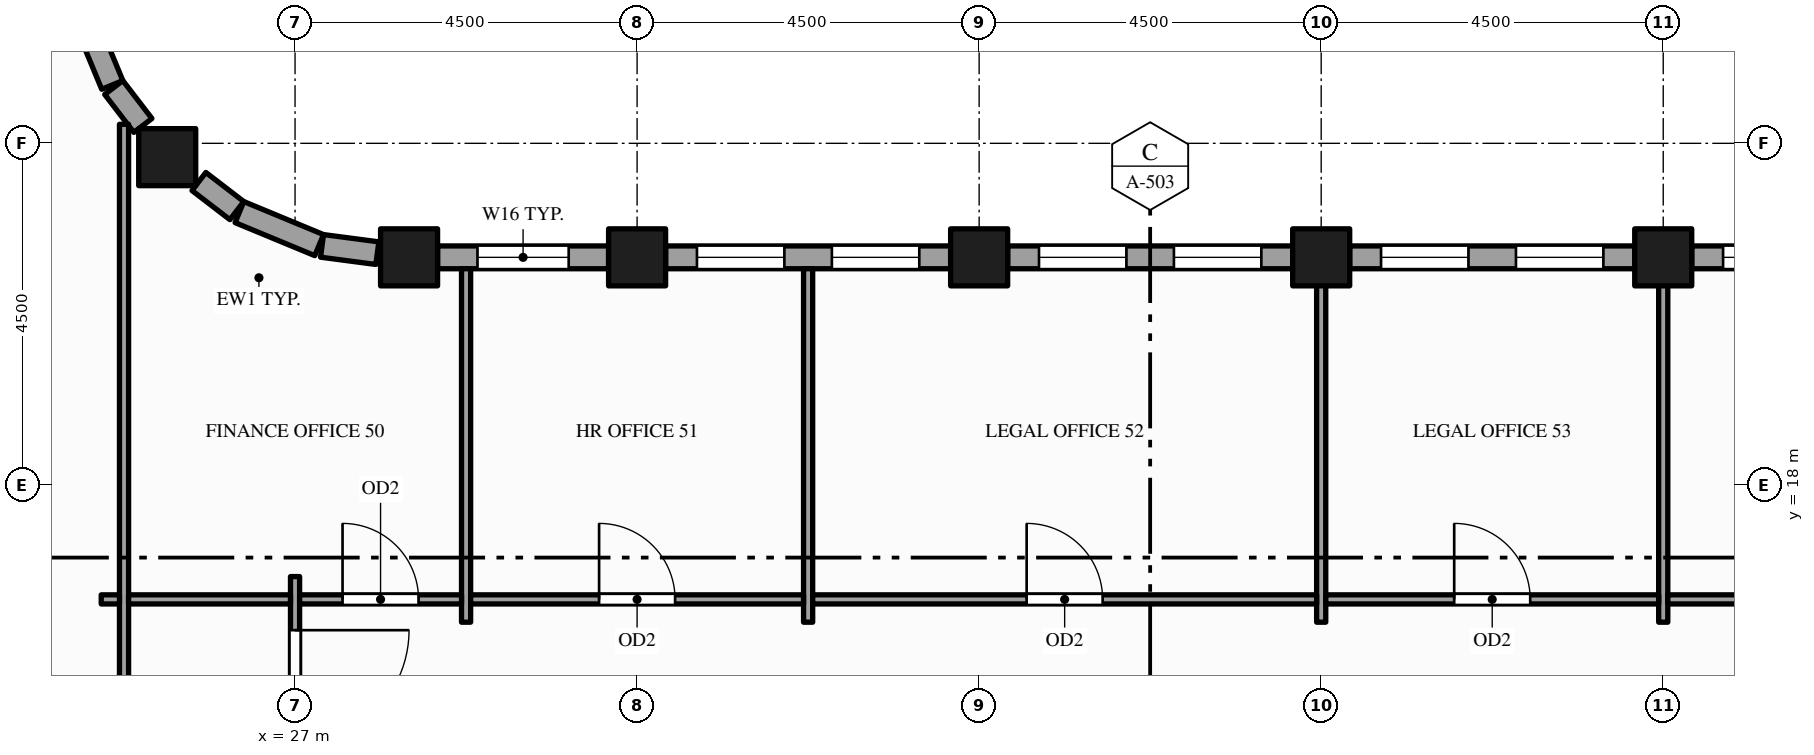
"""IFC4 building model, lengths in metres.
Left out: names, types, materials, properties, quantities, classifications, styles, units other than length and angle.
Written with IfcOpenShell. Run it as: python <this file> out.ifc"""

import sys

from ifc_helpers import new_model, si_unit, direction, frame, frame_2d, origin, origin_2d, place, context, subcontext, project, spatial, rectangle, hollow_rectangle, extrude, element, fill, save


model = new_model("IFC4")
c1 = context("Model", 3, precision=1e-05, world=origin(), true_north=direction((0.0, 1.0)))
c2 = subcontext(c1, "Body", "Model", "MODEL_VIEW")
j1 = project(units=[si_unit("LENGTHUNIT", "METRE"), si_unit("PLANEANGLEUNIT", "RADIAN")], contexts=[c1])
p1 = place(None, origin())
s1 = spatial("IfcSite", under=j1, at=p1, CompositionType="ELEMENT")
p2 = place(p1, origin())
s2 = spatial("IfcBuilding", under=s1, at=p2, CompositionType="ELEMENT")
p3 = place(p2, frame((0.0, 0.0, 195.0)))
s3 = spatial("IfcBuildingStorey", under=s2, at=p3, CompositionType="ELEMENT", Elevation=195.0)
for number, where, z_axis, x_axis in (
    (1, (25.318, 22.318, -0.15), (0.0, 0.0, 1.0), (1.0, 0.0, 0.0)),
    (2, (28.5, 21.0, -0.15), (0.0, 0.0, 1.0), (1.0, 0.0, 0.0)),
    (3, (31.5, 21.0, -0.15), (0.0, 0.0, 1.0), (1.0, 0.0, 0.0)),
    (4, (36.0, 21.0, -0.15), (0.0, 0.0, 1.0), (1.0, 0.0, 0.0)),
    (5, (40.5, 21.0, -0.15), (0.0, 0.0, 1.0), (1.0, 0.0, 0.0)),
    (6, (45.0, 21.0, -0.15), (0.0, 0.0, 1.0), (1.0, 0.0, 0.0)),
):
    element("IfcColumn", number, at=place(p3, frame(where, z_axis=z_axis, x_axis=x_axis)), inside=s3, PredefinedType="COLUMN", context=c2, shape_type="SweptSolid", body=[
        extrude(hollow_rectangle(XDim=0.75, YDim=0.75, WallThickness=0.036, at=origin_2d()), origin(), (0.0, 0.0, 1.0), 4.0),
    ])
p4 = place(p3, frame((49.125, 21.0, 0.0), z_axis=(0.0, 0.0, 1.0), x_axis=(-1.0, 0.0, 0.0)))
e7 = element("IfcWall", 7, at=p4, inside=s3, PredefinedType="STANDARD", context=c2, shape_type="SweptSolid", body=[
    extrude(rectangle(XDim=3.75, YDim=0.3, at=frame_2d((1.875, 0.0))), origin(), (0.0, 0.0, 1.0), 2.87),
])
p5 = place(p4, frame((0.413, 0.0, 0.9)))
e8 = element("IfcOpeningElement", 8, at=p5, cuts=e7, PredefinedType="OPENING", context=c2, shape_type="SweptSolid", body=[
    extrude(rectangle(XDim=1.15, YDim=1.75, at=frame_2d((0.575, 0.875))), frame((0.0, 0.16, 0.0), z_axis=(0.0, -1.0, 0.0), x_axis=(1.0, 0.0, 0.0)), (0.0, 0.0, 1.0), 0.32),
])
p6 = place(p4, frame((2.188, 0.0, 0.9)))
e9 = element("IfcOpeningElement", 9, at=p6, cuts=e7, PredefinedType="OPENING", context=c2, shape_type="SweptSolid", body=[
    extrude(rectangle(XDim=1.15, YDim=1.75, at=frame_2d((0.575, 0.875))), frame((0.0, 0.16, 0.0), z_axis=(0.0, -1.0, 0.0), x_axis=(1.0, 0.0, 0.0)), (0.0, 0.0, 1.0), 0.32),
])
p7 = place(p3, frame((44.625, 21.0, 0.0), z_axis=(0.0, 0.0, 1.0), x_axis=(-1.0, 0.0, 0.0)))
e10 = element("IfcWall", 10, at=p7, inside=s3, PredefinedType="STANDARD", context=c2, shape_type="SweptSolid", body=[
    extrude(rectangle(XDim=3.75, YDim=0.3, at=frame_2d((1.875, 0.0))), origin(), (0.0, 0.0, 1.0), 2.87),
])
p8 = place(p7, frame((0.413, 0.0, 0.9)))
e11 = element("IfcOpeningElement", 11, at=p8, cuts=e10, PredefinedType="OPENING", context=c2, shape_type="SweptSolid", body=[
    extrude(rectangle(XDim=1.15, YDim=1.75, at=frame_2d((0.575, 0.875))), frame((0.0, 0.16, 0.0), z_axis=(0.0, -1.0, 0.0), x_axis=(1.0, 0.0, 0.0)), (0.0, 0.0, 1.0), 0.32),
])
p9 = place(p7, frame((2.188, 0.0, 0.9)))
e12 = element("IfcOpeningElement", 12, at=p9, cuts=e10, PredefinedType="OPENING", context=c2, shape_type="SweptSolid", body=[
    extrude(rectangle(XDim=1.15, YDim=1.75, at=frame_2d((0.575, 0.875))), frame((0.0, 0.16, 0.0), z_axis=(0.0, -1.0, 0.0), x_axis=(1.0, 0.0, 0.0)), (0.0, 0.0, 1.0), 0.32),
])
p10 = place(p3, frame((40.125, 21.0, 0.0), z_axis=(0.0, 0.0, 1.0), x_axis=(-1.0, 0.0, 0.0)))
e13 = element("IfcWall", 13, at=p10, inside=s3, PredefinedType="STANDARD", context=c2, shape_type="SweptSolid", body=[
    extrude(rectangle(XDim=3.75, YDim=0.3, at=frame_2d((1.875, 0.0))), origin(), (0.0, 0.0, 1.0), 2.87),
])
p11 = place(p10, frame((0.413, 0.0, 0.9)))
e14 = element("IfcOpeningElement", 14, at=p11, cuts=e13, PredefinedType="OPENING", context=c2, shape_type="SweptSolid", body=[
    extrude(rectangle(XDim=1.15, YDim=1.75, at=frame_2d((0.575, 0.875))), frame((0.0, 0.16, 0.0), z_axis=(0.0, -1.0, 0.0), x_axis=(1.0, 0.0, 0.0)), (0.0, 0.0, 1.0), 0.32),
])
p12 = place(p10, frame((2.188, 0.0, 0.9)))
e15 = element("IfcOpeningElement", 15, at=p12, cuts=e13, PredefinedType="OPENING", context=c2, shape_type="SweptSolid", body=[
    extrude(rectangle(XDim=1.15, YDim=1.75, at=frame_2d((0.575, 0.875))), frame((0.0, 0.16, 0.0), z_axis=(0.0, -1.0, 0.0), x_axis=(1.0, 0.0, 0.0)), (0.0, 0.0, 1.0), 0.32),
])
p13 = place(p3, frame((35.625, 21.0, 0.0), z_axis=(0.0, 0.0, 1.0), x_axis=(-1.0, 0.0, 0.0)))
e16 = element("IfcWall", 16, at=p13, inside=s3, PredefinedType="STANDARD", context=c2, shape_type="SweptSolid", body=[
    extrude(rectangle(XDim=3.75, YDim=0.3, at=frame_2d((1.875, 0.0))), origin(), (0.0, 0.0, 1.0), 2.87),
])
p14 = place(p13, frame((0.413, 0.0, 0.9)))
e17 = element("IfcOpeningElement", 17, at=p14, cuts=e16, PredefinedType="OPENING", context=c2, shape_type="SweptSolid", body=[
    extrude(rectangle(XDim=1.15, YDim=1.75, at=frame_2d((0.575, 0.875))), frame((0.0, 0.16, 0.0), z_axis=(0.0, -1.0, 0.0), x_axis=(1.0, 0.0, 0.0)), (0.0, 0.0, 1.0), 0.32),
])
p15 = place(p13, frame((2.188, 0.0, 0.9)))
e18 = element("IfcOpeningElement", 18, at=p15, cuts=e16, PredefinedType="OPENING", context=c2, shape_type="SweptSolid", body=[
    extrude(rectangle(XDim=1.15, YDim=1.75, at=frame_2d((0.575, 0.875))), frame((0.0, 0.16, 0.0), z_axis=(0.0, -1.0, 0.0), x_axis=(1.0, 0.0, 0.0)), (0.0, 0.0, 1.0), 0.32),
])
p16 = place(p3, frame((31.125, 21.0, 0.0), z_axis=(0.0, 0.0, 1.0), x_axis=(-1.0, 0.0, 0.0)))
e19 = element("IfcWall", 19, at=p16, inside=s3, PredefinedType="STANDARD", context=c2, shape_type="SweptSolid", body=[
    extrude(rectangle(XDim=2.25, YDim=0.3, at=frame_2d((1.125, 0.0))), origin(), (0.0, 0.0, 1.0), 2.87),
])
p17 = place(p16, frame((0.525, 0.0, 0.9)))
e20 = element("IfcOpeningElement", 20, at=p17, cuts=e19, PredefinedType="OPENING", context=c2, shape_type="SweptSolid", body=[
    extrude(rectangle(XDim=1.2, YDim=1.75, at=frame_2d((0.6, 0.875))), frame((0.0, 0.16, 0.0), z_axis=(0.0, -1.0, 0.0), x_axis=(1.0, 0.0, 0.0)), (0.0, 0.0, 1.0), 0.32),
])
p18 = place(p3, frame((28.083, 21.055, 0.0), z_axis=(0.0, 0.0, 1.0), x_axis=(-0.99142711513, 0.130660917588, 0.0)))
e21 = element("IfcWall", 21, at=p18, inside=s3, PredefinedType="STANDARD", context=c2, shape_type="SweptSolid", body=[
    extrude(rectangle(XDim=0.734, YDim=0.3, at=frame_2d((0.367, 0.0))), origin(), (0.0, 0.0, 1.0), 3.157),
])
p19 = place(p3, frame((27.317, 21.161, 0.0), z_axis=(0.0, 0.0, 1.0), x_axis=(-0.923914616768, 0.382598720491, 0.0)))
e22 = element("IfcWall", 22, at=p19, inside=s3, PredefinedType="STANDARD", context=c2, shape_type="SweptSolid", body=[
    extrude(rectangle(XDim=1.135, YDim=0.3, at=frame_2d((0.568, 0.0))), origin(), (0.0, 0.0, 1.0), 2.87),
])
p20 = place(p3, frame((26.234, 21.615, 0.0), z_axis=(0.0, 0.0, 1.0), x_axis=(-0.793575131083, 0.608472276547, 0.0)))
e23 = element("IfcWall", 23, at=p20, inside=s3, PredefinedType="STANDARD", context=c2, shape_type="SweptSolid", body=[
    extrude(rectangle(XDim=0.629, YDim=0.3, at=frame_2d((0.314, 0.0))), origin(), (0.0, 0.0, 1.0), 3.157),
])
p21 = place(p3, frame((24.998, 22.735, 0.0), z_axis=(0.0, 0.0, 1.0), x_axis=(-0.608472276547, 0.793575131083, 0.0)))
e24 = element("IfcWall", 24, at=p21, inside=s3, PredefinedType="STANDARD", context=c2, shape_type="SweptSolid", body=[
    extrude(rectangle(XDim=0.629, YDim=0.3, at=frame_2d((0.314, 0.0))), origin(), (0.0, 0.0, 1.0), 2.76),
])
p22 = place(p3, frame((24.595, 23.268, 0.0), z_axis=(0.0, 0.0, 1.0), x_axis=(-0.382598720491, 0.923914616768, 0.0)))
e25 = element("IfcWall", 25, at=p22, inside=s3, PredefinedType="STANDARD", context=c2, shape_type="SweptSolid", body=[
    extrude(rectangle(XDim=1.135, YDim=0.3, at=frame_2d((0.568, 0.0))), origin(), (0.0, 0.0, 1.0), 2.76),
])
p23 = place(p3, frame((24.75, -1.35, 0.0), z_axis=(0.0, 0.0, 1.0), x_axis=(0.0, 1.0, 0.0)))
e26 = element("IfcWall", 26, at=p23, inside=s3, PredefinedType="PARTITIONING", context=c2, shape_type="SweptSolid", body=[
    extrude(rectangle(XDim=24.101, YDim=0.12, at=frame_2d((12.05, 0.0))), origin(), (0.0, 0.0, 1.0), 2.76),
])
p24 = place(p23, frame((10.725, 0.0, 0.0)))
e27 = element("IfcOpeningElement", 27, at=p24, cuts=e26, PredefinedType="OPENING", context=c2, shape_type="SweptSolid", body=[
    extrude(rectangle(XDim=1.5, YDim=2.1, at=frame_2d((0.75, 1.05))), frame((0.0, 0.07, 0.0), z_axis=(0.0, -1.0, 0.0), x_axis=(1.0, 0.0, 0.0)), (0.0, 0.0, 1.0), 0.14),
])
p25 = place(p23, frame((14.625, 0.0, 0.0)))
e28 = element("IfcOpeningElement", 28, at=p25, cuts=e26, PredefinedType="OPENING", context=c2, shape_type="SweptSolid", body=[
    extrude(rectangle(XDim=1.2, YDim=2.1, at=frame_2d((0.6, 1.05))), frame((0.0, 0.07, 0.0), z_axis=(0.0, -1.0, 0.0), x_axis=(1.0, 0.0, 0.0)), (0.0, 0.0, 1.0), 0.14),
])
p26 = place(p3, frame((27.0, 2.7, 0.0), z_axis=(0.0, 0.0, 1.0), x_axis=(0.0, 1.0, 0.0)))
e29 = element("IfcWall", 29, at=p26, inside=s3, PredefinedType="PARTITIONING", context=c2, shape_type="SweptSolid", body=[
    extrude(rectangle(XDim=14.1, YDim=0.12, at=frame_2d((7.05, 0.0))), origin(), (0.0, 0.0, 1.0), 2.87),
])
p27 = place(p26, frame((0.705, 0.0, 0.0)))
e30 = element("IfcOpeningElement", 30, at=p27, cuts=e29, PredefinedType="OPENING", context=c2, shape_type="SweptSolid", body=[
    extrude(rectangle(XDim=1.5, YDim=2.1, at=frame_2d((0.75, 1.05))), frame((0.0, 0.07, 0.0), z_axis=(0.0, -1.0, 0.0), x_axis=(1.0, 0.0, 0.0)), (0.0, 0.0, 1.0), 0.14),
])
p28 = place(p26, frame((11.895, 0.0, 0.0)))
e31 = element("IfcOpeningElement", 31, at=p28, cuts=e29, PredefinedType="OPENING", context=c2, shape_type="SweptSolid", body=[
    extrude(rectangle(XDim=1.5, YDim=2.1, at=frame_2d((0.75, 1.05))), frame((0.0, 0.07, 0.0), z_axis=(0.0, -1.0, 0.0), x_axis=(1.0, 0.0, 0.0)), (0.0, 0.0, 1.0), 0.14),
])
for number, where, z_axis, x_axis in (
    (32, (29.25, 16.2, 0.0), (0.0, 0.0, 1.0), (0.0, 1.0, 0.0)),
    (33, (33.75, 16.2, 0.0), (0.0, 0.0, 1.0), (0.0, 1.0, 0.0)),
    (34, (40.5, 16.2, 0.0), (0.0, 0.0, 1.0), (0.0, 1.0, 0.0)),
    (35, (45.0, 16.2, 0.0), (0.0, 0.0, 1.0), (0.0, 1.0, 0.0)),
):
    element("IfcWall", number, at=place(p3, frame(where, z_axis=z_axis, x_axis=x_axis)), inside=s3, PredefinedType="PARTITIONING", context=c2, shape_type="SweptSolid", body=[
        extrude(rectangle(XDim=4.65, YDim=0.12, at=frame_2d((2.325, 0.0))), origin(), (0.0, 0.0, 1.0), 2.87),
    ])
p29 = place(p3, frame((24.45, 16.5, 0.0), z_axis=(0.0, 0.0, 1.0), x_axis=(1.0, 0.0, 0.0)))
e36 = element("IfcWall", 36, at=p29, inside=s3, PredefinedType="PARTITIONING", context=c2, shape_type="SweptSolid", body=[
    extrude(rectangle(XDim=0.24, YDim=0.12, at=frame_2d((0.12, 0.0))), origin(), (0.0, 0.0, 1.0), 2.76),
])
p30 = place(p3, frame((24.81, 16.5, 0.0), z_axis=(0.0, 0.0, 1.0), x_axis=(1.0, 0.0, 0.0)))
e37 = element("IfcWall", 37, at=p30, inside=s3, PredefinedType="PARTITIONING", context=c2, shape_type="SweptSolid", body=[
    extrude(rectangle(XDim=2.13, YDim=0.12, at=frame_2d((1.065, 0.0))), origin(), (0.0, 0.0, 1.0), 2.76),
])
p31 = place(p3, frame((27.06, 16.5, 0.0), z_axis=(0.0, 0.0, 1.0), x_axis=(1.0, 0.0, 0.0)))
e38 = element("IfcWall", 38, at=p31, inside=s3, PredefinedType="PARTITIONING", context=c2, shape_type="SweptSolid", body=[
    extrude(rectangle(XDim=2.13, YDim=0.12, at=frame_2d((1.065, 0.0))), origin(), (0.0, 0.0, 1.0), 2.87),
])
p32 = place(p31, frame((0.565, 0.0, 0.0)))
e39 = element("IfcOpeningElement", 39, at=p32, cuts=e38, PredefinedType="OPENING", context=c2, shape_type="SweptSolid", body=[
    extrude(rectangle(XDim=1.0, YDim=2.1, at=frame_2d((0.5, 1.05))), frame((0.0, 0.07, 0.0), z_axis=(0.0, -1.0, 0.0), x_axis=(1.0, 0.0, 0.0)), (0.0, 0.0, 1.0), 0.14),
])
p33 = place(p3, frame((29.31, 16.5, 0.0), z_axis=(0.0, 0.0, 1.0), x_axis=(1.0, 0.0, 0.0)))
e40 = element("IfcWall", 40, at=p33, inside=s3, PredefinedType="PARTITIONING", context=c2, shape_type="SweptSolid", body=[
    extrude(rectangle(XDim=4.38, YDim=0.12, at=frame_2d((2.19, 0.0))), origin(), (0.0, 0.0, 1.0), 2.87),
])
p34 = place(p33, frame((1.69, 0.0, 0.0)))
e41 = element("IfcOpeningElement", 41, at=p34, cuts=e40, PredefinedType="OPENING", context=c2, shape_type="SweptSolid", body=[
    extrude(rectangle(XDim=1.0, YDim=2.1, at=frame_2d((0.5, 1.05))), frame((0.0, 0.07, 0.0), z_axis=(0.0, -1.0, 0.0), x_axis=(1.0, 0.0, 0.0)), (0.0, 0.0, 1.0), 0.14),
])
p35 = place(p3, frame((33.81, 16.5, 0.0), z_axis=(0.0, 0.0, 1.0), x_axis=(1.0, 0.0, 0.0)))
e42 = element("IfcWall", 42, at=p35, inside=s3, PredefinedType="PARTITIONING", context=c2, shape_type="SweptSolid", body=[
    extrude(rectangle(XDim=6.63, YDim=0.12, at=frame_2d((3.315, 0.0))), origin(), (0.0, 0.0, 1.0), 2.87),
])
p36 = place(p35, frame((2.815, 0.0, 0.0)))
e43 = element("IfcOpeningElement", 43, at=p36, cuts=e42, PredefinedType="OPENING", context=c2, shape_type="SweptSolid", body=[
    extrude(rectangle(XDim=1.0, YDim=2.1, at=frame_2d((0.5, 1.05))), frame((0.0, 0.07, 0.0), z_axis=(0.0, -1.0, 0.0), x_axis=(1.0, 0.0, 0.0)), (0.0, 0.0, 1.0), 0.14),
])
p37 = place(p3, frame((40.56, 16.5, 0.0), z_axis=(0.0, 0.0, 1.0), x_axis=(1.0, 0.0, 0.0)))
e44 = element("IfcWall", 44, at=p37, inside=s3, PredefinedType="PARTITIONING", context=c2, shape_type="SweptSolid", body=[
    extrude(rectangle(XDim=4.38, YDim=0.12, at=frame_2d((2.19, 0.0))), origin(), (0.0, 0.0, 1.0), 2.87),
])
p38 = place(p37, frame((1.69, 0.0, 0.0)))
e45 = element("IfcOpeningElement", 45, at=p38, cuts=e44, PredefinedType="OPENING", context=c2, shape_type="SweptSolid", body=[
    extrude(rectangle(XDim=1.0, YDim=2.1, at=frame_2d((0.5, 1.05))), frame((0.0, 0.07, 0.0), z_axis=(0.0, -1.0, 0.0), x_axis=(1.0, 0.0, 0.0)), (0.0, 0.0, 1.0), 0.14),
])
p39 = place(p3, frame((45.06, 16.5, 0.0), z_axis=(0.0, 0.0, 1.0), x_axis=(1.0, 0.0, 0.0)))
e46 = element("IfcWall", 46, at=p39, inside=s3, PredefinedType="PARTITIONING", context=c2, shape_type="SweptSolid", body=[
    extrude(rectangle(XDim=4.38, YDim=0.12, at=frame_2d((2.19, 0.0))), origin(), (0.0, 0.0, 1.0), 2.87),
])
p40 = place(p39, frame((1.69, 0.0, 0.0)))
e47 = element("IfcOpeningElement", 47, at=p40, cuts=e46, PredefinedType="OPENING", context=c2, shape_type="SweptSolid", body=[
    extrude(rectangle(XDim=1.0, YDim=2.1, at=frame_2d((0.5, 1.05))), frame((0.0, 0.07, 0.0), z_axis=(0.0, -1.0, 0.0), x_axis=(1.0, 0.0, 0.0)), (0.0, 0.0, 1.0), 0.14),
])
p41 = place(p6, origin())
e48 = element("IfcWindow", 48, at=p41, inside=s3, PartitioningType="SINGLE_PANEL", PredefinedType="WINDOW", context=c2, shape_type="SweptSolid", body=[
    extrude(rectangle(XDim=1.15, YDim=1.75, at=frame_2d((0.575, 0.875))), frame((0.0, 0.03, 0.0), z_axis=(0.0, -1.0, 0.0), x_axis=(1.0, 0.0, 0.0)), (0.0, 0.0, 1.0), 0.06),
])
fill(e9, e48)
p42 = place(p8, origin())
e49 = element("IfcWindow", 49, at=p42, inside=s3, PartitioningType="SINGLE_PANEL", PredefinedType="WINDOW", context=c2, shape_type="SweptSolid", body=[
    extrude(rectangle(XDim=1.15, YDim=1.75, at=frame_2d((0.575, 0.875))), frame((0.0, 0.03, 0.0), z_axis=(0.0, -1.0, 0.0), x_axis=(1.0, 0.0, 0.0)), (0.0, 0.0, 1.0), 0.06),
])
fill(e11, e49)
p43 = place(p9, origin())
e50 = element("IfcWindow", 50, at=p43, inside=s3, PartitioningType="SINGLE_PANEL", PredefinedType="WINDOW", context=c2, shape_type="SweptSolid", body=[
    extrude(rectangle(XDim=1.15, YDim=1.75, at=frame_2d((0.575, 0.875))), frame((0.0, 0.03, 0.0), z_axis=(0.0, -1.0, 0.0), x_axis=(1.0, 0.0, 0.0)), (0.0, 0.0, 1.0), 0.06),
])
fill(e12, e50)
p44 = place(p11, origin())
e51 = element("IfcWindow", 51, at=p44, inside=s3, PartitioningType="SINGLE_PANEL", PredefinedType="WINDOW", context=c2, shape_type="SweptSolid", body=[
    extrude(rectangle(XDim=1.15, YDim=1.75, at=frame_2d((0.575, 0.875))), frame((0.0, 0.03, 0.0), z_axis=(0.0, -1.0, 0.0), x_axis=(1.0, 0.0, 0.0)), (0.0, 0.0, 1.0), 0.06),
])
fill(e14, e51)
p45 = place(p12, origin())
e52 = element("IfcWindow", 52, at=p45, inside=s3, PartitioningType="SINGLE_PANEL", PredefinedType="WINDOW", context=c2, shape_type="SweptSolid", body=[
    extrude(rectangle(XDim=1.15, YDim=1.75, at=frame_2d((0.575, 0.875))), frame((0.0, 0.03, 0.0), z_axis=(0.0, -1.0, 0.0), x_axis=(1.0, 0.0, 0.0)), (0.0, 0.0, 1.0), 0.06),
])
fill(e15, e52)
p46 = place(p14, origin())
e53 = element("IfcWindow", 53, at=p46, inside=s3, PartitioningType="SINGLE_PANEL", PredefinedType="WINDOW", context=c2, shape_type="SweptSolid", body=[
    extrude(rectangle(XDim=1.15, YDim=1.75, at=frame_2d((0.575, 0.875))), frame((0.0, 0.03, 0.0), z_axis=(0.0, -1.0, 0.0), x_axis=(1.0, 0.0, 0.0)), (0.0, 0.0, 1.0), 0.06),
])
fill(e17, e53)
p47 = place(p15, origin())
e54 = element("IfcWindow", 54, at=p47, inside=s3, PartitioningType="SINGLE_PANEL", PredefinedType="WINDOW", context=c2, shape_type="SweptSolid", body=[
    extrude(rectangle(XDim=1.15, YDim=1.75, at=frame_2d((0.575, 0.875))), frame((0.0, 0.03, 0.0), z_axis=(0.0, -1.0, 0.0), x_axis=(1.0, 0.0, 0.0)), (0.0, 0.0, 1.0), 0.06),
])
fill(e18, e54)
p48 = place(p17, origin())
e55 = element("IfcWindow", 55, at=p48, inside=s3, PartitioningType="SINGLE_PANEL", PredefinedType="WINDOW", context=c2, shape_type="SweptSolid", body=[
    extrude(rectangle(XDim=1.2, YDim=1.75, at=frame_2d((0.6, 0.875))), frame((0.0, 0.03, 0.0), z_axis=(0.0, -1.0, 0.0), x_axis=(1.0, 0.0, 0.0)), (0.0, 0.0, 1.0), 0.06),
])
fill(e20, e55)
p49 = place(p28, origin())
e56 = element("IfcDoor", 56, at=p49, inside=s3, OperationType="SINGLE_SWING_RIGHT", PredefinedType="DOOR", context=c2, shape_type="SweptSolid", body=[
    extrude(rectangle(XDim=1.5, YDim=2.1, at=frame_2d((0.75, 1.05))), frame((0.0, 0.025, 0.0), z_axis=(0.0, -1.0, 0.0), x_axis=(1.0, 0.0, 0.0)), (0.0, 0.0, 1.0), 0.05),
])
fill(e31, e56)
p50 = place(p32, origin())
e57 = element("IfcDoor", 57, at=p50, inside=s3, OperationType="SINGLE_SWING_LEFT", PredefinedType="DOOR", context=c2, shape_type="SweptSolid", body=[
    extrude(rectangle(XDim=1.0, YDim=2.1, at=frame_2d((0.5, 1.05))), frame((0.0, 0.025, 0.0), z_axis=(0.0, -1.0, 0.0), x_axis=(1.0, 0.0, 0.0)), (0.0, 0.0, 1.0), 0.05),
])
fill(e39, e57)
p51 = place(p34, origin())
e58 = element("IfcDoor", 58, at=p51, inside=s3, OperationType="SINGLE_SWING_LEFT", PredefinedType="DOOR", context=c2, shape_type="SweptSolid", body=[
    extrude(rectangle(XDim=1.0, YDim=2.1, at=frame_2d((0.5, 1.05))), frame((0.0, 0.025, 0.0), z_axis=(0.0, -1.0, 0.0), x_axis=(1.0, 0.0, 0.0)), (0.0, 0.0, 1.0), 0.05),
])
fill(e41, e58)
p52 = place(p36, origin())
e59 = element("IfcDoor", 59, at=p52, inside=s3, OperationType="SINGLE_SWING_LEFT", PredefinedType="DOOR", context=c2, shape_type="SweptSolid", body=[
    extrude(rectangle(XDim=1.0, YDim=2.1, at=frame_2d((0.5, 1.05))), frame((0.0, 0.025, 0.0), z_axis=(0.0, -1.0, 0.0), x_axis=(1.0, 0.0, 0.0)), (0.0, 0.0, 1.0), 0.05),
])
fill(e43, e59)
p53 = place(p38, origin())
e60 = element("IfcDoor", 60, at=p53, inside=s3, OperationType="SINGLE_SWING_LEFT", PredefinedType="DOOR", context=c2, shape_type="SweptSolid", body=[
    extrude(rectangle(XDim=1.0, YDim=2.1, at=frame_2d((0.5, 1.05))), frame((0.0, 0.025, 0.0), z_axis=(0.0, -1.0, 0.0), x_axis=(1.0, 0.0, 0.0)), (0.0, 0.0, 1.0), 0.05),
])
fill(e45, e60)
save(model, sys.argv[1])
